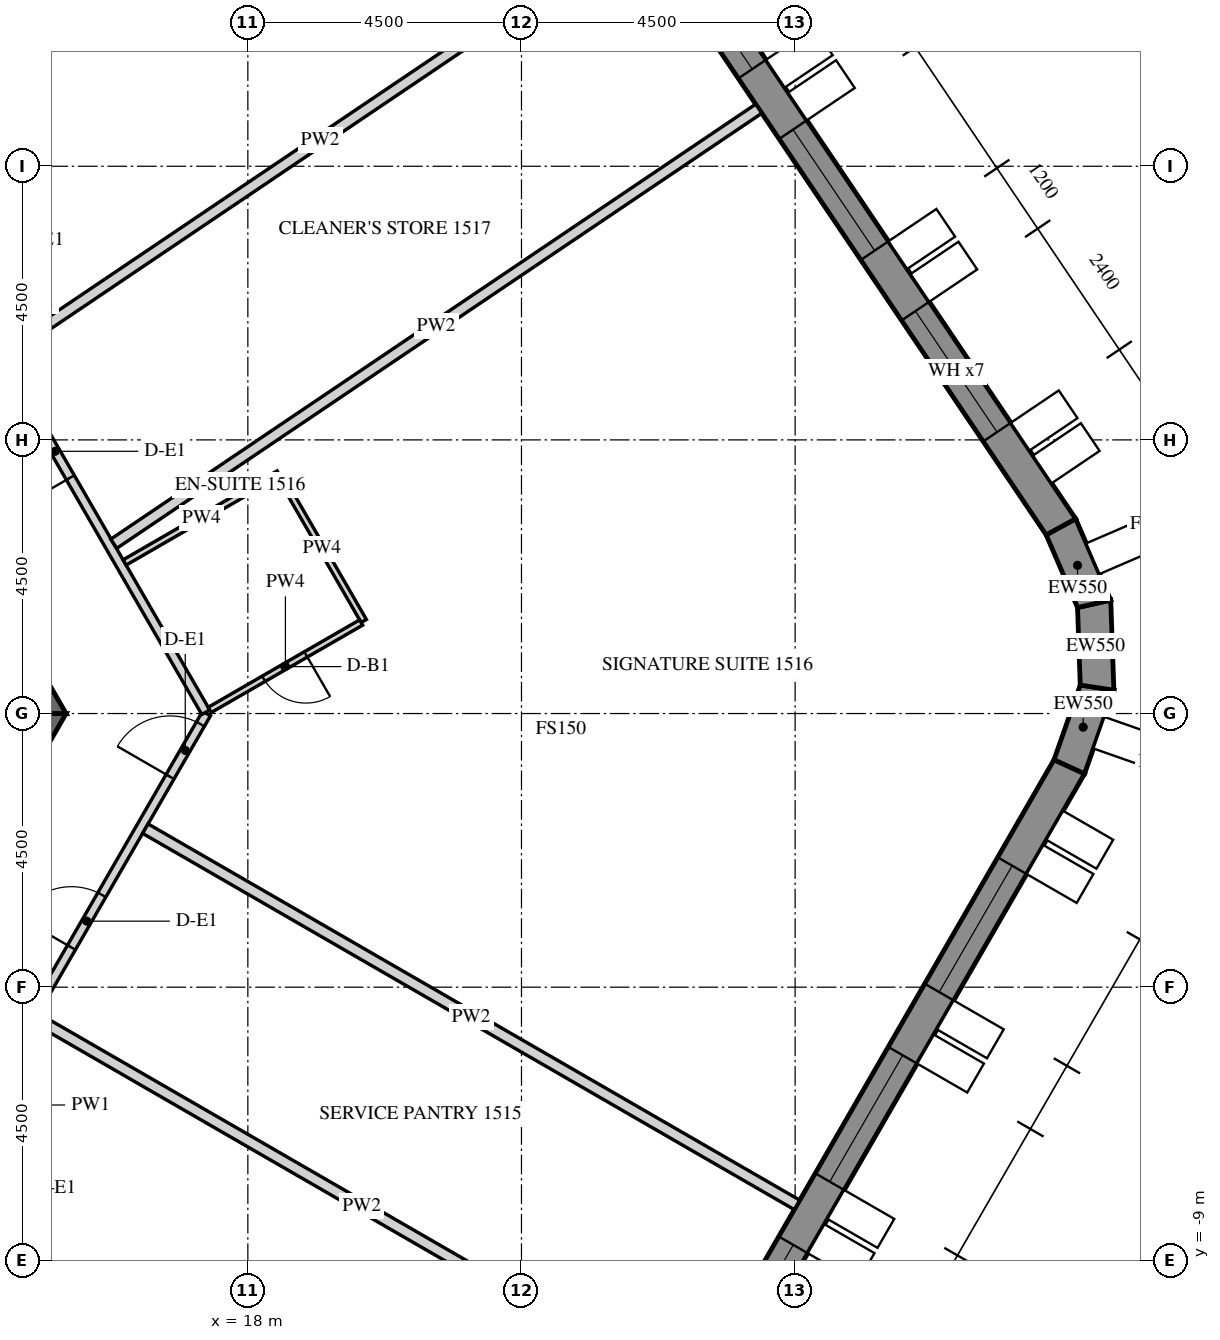
"""IFC4 building model, lengths in metres.
Left out: names, types, materials, properties, quantities, classifications, styles, units other than length and angle.
Written with IfcOpenShell. Run it as: python <this file> out.ifc"""

import sys

from ifc_helpers import new_model, si_unit, direction, frame, frame_2d, origin, place, context, subcontext, project, spatial, polyline, rectangle, outline, extrude, element, fill, save


model = new_model("IFC4")
c1 = context("Model", 3, precision=1e-05, world=origin(), true_north=direction((0.0, 1.0)))
c2 = subcontext(c1, "Body", "Model", "MODEL_VIEW")
j1 = project(units=[si_unit("LENGTHUNIT", "METRE"), si_unit("PLANEANGLEUNIT", "RADIAN")], contexts=[c1])
p1 = place(None, origin())
s1 = spatial("IfcSite", under=j1, at=p1, CompositionType="ELEMENT")
p2 = place(p1, origin())
s2 = spatial("IfcBuilding", under=s1, at=p2, CompositionType="ELEMENT")
p3 = place(p2, frame((0.0, 0.0, 195.6)))
s3 = spatial("IfcBuildingStorey", under=s2, at=p3, CompositionType="ELEMENT", Elevation=195.6)
p4 = place(p3, frame((17.63, -24.914, -0.15), z_axis=(0.0, 0.0, 1.0), x_axis=(0.499998569178, 0.866026229868, 0.0)))
e1 = element("IfcWall", 1, at=p4, inside=s3, PredefinedType="SOLIDWALL", context=c2, shape_type="SweptSolid", body=[
    extrude(outline(polyline([(-0.022, -0.275), (27.783, -0.275), (27.732, 0.275), (0.022, 0.275), (-0.022, -0.275)])), origin(), (0.0, 0.0, 1.0), 3.9),
])
p5 = place(p4, frame((1.879, 0.0, 1.05)))
e2 = element("IfcOpeningElement", 2, at=p5, cuts=e1, PredefinedType="OPENING", context=c2, shape_type="SweptSolid", body=[
    extrude(rectangle(XDim=2.4, YDim=2.4, at=frame_2d((1.2, 1.2))), frame((0.0, 0.285, 0.0), z_axis=(0.0, -1.0, 0.0), x_axis=(1.0, 0.0, 0.0)), (0.0, 0.0, 1.0), 0.57),
])
p6 = place(p4, frame((5.479, 0.0, 1.05)))
e3 = element("IfcOpeningElement", 3, at=p6, cuts=e1, PredefinedType="OPENING", context=c2, shape_type="SweptSolid", body=[
    extrude(rectangle(XDim=2.4, YDim=2.4, at=frame_2d((1.2, 1.2))), frame((0.0, 0.285, 0.0), z_axis=(0.0, -1.0, 0.0), x_axis=(1.0, 0.0, 0.0)), (0.0, 0.0, 1.0), 0.57),
])
p7 = place(p4, frame((9.079, 0.0, 1.05)))
e4 = element("IfcOpeningElement", 4, at=p7, cuts=e1, PredefinedType="OPENING", context=c2, shape_type="SweptSolid", body=[
    extrude(rectangle(XDim=2.4, YDim=2.4, at=frame_2d((1.2, 1.2))), frame((0.0, 0.285, 0.0), z_axis=(0.0, -1.0, 0.0), x_axis=(1.0, 0.0, 0.0)), (0.0, 0.0, 1.0), 0.57),
])
p8 = place(p4, frame((12.679, 0.0, 1.05)))
e5 = element("IfcOpeningElement", 5, at=p8, cuts=e1, PredefinedType="OPENING", context=c2, shape_type="SweptSolid", body=[
    extrude(rectangle(XDim=2.4, YDim=2.4, at=frame_2d((1.2, 1.2))), frame((0.0, 0.285, 0.0), z_axis=(0.0, -1.0, 0.0), x_axis=(1.0, 0.0, 0.0)), (0.0, 0.0, 1.0), 0.57),
])
p9 = place(p4, frame((16.279, 0.0, 1.05)))
e6 = element("IfcOpeningElement", 6, at=p9, cuts=e1, PredefinedType="OPENING", context=c2, shape_type="SweptSolid", body=[
    extrude(rectangle(XDim=2.4, YDim=2.4, at=frame_2d((1.2, 1.2))), frame((0.0, 0.285, 0.0), z_axis=(0.0, -1.0, 0.0), x_axis=(1.0, 0.0, 0.0)), (0.0, 0.0, 1.0), 0.57),
])
p10 = place(p4, frame((19.879, 0.0, 1.05)))
e7 = element("IfcOpeningElement", 7, at=p10, cuts=e1, PredefinedType="OPENING", context=c2, shape_type="SweptSolid", body=[
    extrude(rectangle(XDim=2.4, YDim=2.4, at=frame_2d((1.2, 1.2))), frame((0.0, 0.285, 0.0), z_axis=(0.0, -1.0, 0.0), x_axis=(1.0, 0.0, 0.0)), (0.0, 0.0, 1.0), 0.57),
])
p11 = place(p4, frame((23.479, 0.0, 1.05)))
e8 = element("IfcOpeningElement", 8, at=p11, cuts=e1, PredefinedType="OPENING", context=c2, shape_type="SweptSolid", body=[
    extrude(rectangle(XDim=2.4, YDim=2.4, at=frame_2d((1.2, 1.2))), frame((0.0, 0.285, 0.0), z_axis=(0.0, -1.0, 0.0), x_axis=(1.0, 0.0, 0.0)), (0.0, 0.0, 1.0), 0.57),
])
p12 = place(p3, frame((31.509, -0.875, -0.15), z_axis=(0.0, 0.0, 1.0), x_axis=(0.33111537203, 0.943590276765, 0.0)))
e9 = element("IfcWall", 9, at=p12, inside=s3, PredefinedType="SOLIDWALL", context=c2, shape_type="SweptSolid", body=[
    extrude(outline(polyline([(-0.026, -0.275), (1.431, -0.275), (1.327, 0.275), (0.026, 0.275), (-0.026, -0.275)])), origin(), (0.0, 0.0, 1.0), 3.9),
])
p13 = place(p3, frame((31.966, 0.426, -0.15), z_axis=(0.0, 0.0, 1.0), x_axis=(-0.034876908462, 0.999391615562, 0.0)))
e10 = element("IfcWall", 10, at=p13, inside=s3, PredefinedType="SOLIDWALL", context=c2, shape_type="SweptSolid", body=[
    extrude(outline(polyline([(-0.052, -0.275), (1.431, -0.275), (1.327, 0.275), (0.052, 0.275), (-0.052, -0.275)])), origin(), (0.0, 0.0, 1.0), 3.9),
])
p14 = place(p3, frame((31.917, 1.804, -0.15), z_axis=(0.0, 0.0, 1.0), x_axis=(-0.396225741392, 0.918153125496, 0.0)))
e11 = element("IfcWall", 11, at=p14, inside=s3, PredefinedType="SOLIDWALL", context=c2, shape_type="SweptSolid", body=[
    extrude(outline(polyline([(-0.052, -0.275), (1.405, -0.275), (1.353, 0.275), (0.052, 0.275), (-0.052, -0.275)])), origin(), (0.0, 0.0, 1.0), 3.9),
])
p15 = place(p3, frame((31.371, 3.071, -0.15), z_axis=(0.0, 0.0, 1.0), x_axis=(-0.559189891278, 0.829039604297, 0.0)))
e12 = element("IfcWall", 12, at=p15, inside=s3, PredefinedType="SOLIDWALL", context=c2, shape_type="SweptSolid", body=[
    extrude(outline(polyline([(-0.026, -0.275), (27.781, -0.275), (27.736, 0.275), (0.026, 0.275), (-0.026, -0.275)])), origin(), (0.0, 0.0, 1.0), 3.9),
])
p16 = place(p15, frame((1.879, 0.0, 1.05)))
e13 = element("IfcOpeningElement", 13, at=p16, cuts=e12, PredefinedType="OPENING", context=c2, shape_type="SweptSolid", body=[
    extrude(rectangle(XDim=2.4, YDim=2.4, at=frame_2d((1.2, 1.2))), frame((0.0, 0.285, 0.0), z_axis=(0.0, -1.0, 0.0), x_axis=(1.0, 0.0, 0.0)), (0.0, 0.0, 1.0), 0.57),
])
p17 = place(p15, frame((5.479, 0.0, 1.05)))
e14 = element("IfcOpeningElement", 14, at=p17, cuts=e12, PredefinedType="OPENING", context=c2, shape_type="SweptSolid", body=[
    extrude(rectangle(XDim=2.4, YDim=2.4, at=frame_2d((1.2, 1.2))), frame((0.0, 0.285, 0.0), z_axis=(0.0, -1.0, 0.0), x_axis=(1.0, 0.0, 0.0)), (0.0, 0.0, 1.0), 0.57),
])
p18 = place(p15, frame((9.079, 0.0, 1.05)))
e15 = element("IfcOpeningElement", 15, at=p18, cuts=e12, PredefinedType="OPENING", context=c2, shape_type="SweptSolid", body=[
    extrude(rectangle(XDim=2.4, YDim=2.4, at=frame_2d((1.2, 1.2))), frame((0.0, 0.285, 0.0), z_axis=(0.0, -1.0, 0.0), x_axis=(1.0, 0.0, 0.0)), (0.0, 0.0, 1.0), 0.57),
])
p19 = place(p15, frame((12.679, 0.0, 1.05)))
e16 = element("IfcOpeningElement", 16, at=p19, cuts=e12, PredefinedType="OPENING", context=c2, shape_type="SweptSolid", body=[
    extrude(rectangle(XDim=2.4, YDim=2.4, at=frame_2d((1.2, 1.2))), frame((0.0, 0.285, 0.0), z_axis=(0.0, -1.0, 0.0), x_axis=(1.0, 0.0, 0.0)), (0.0, 0.0, 1.0), 0.57),
])
p20 = place(p15, frame((16.279, 0.0, 1.05)))
e17 = element("IfcOpeningElement", 17, at=p20, cuts=e12, PredefinedType="OPENING", context=c2, shape_type="SweptSolid", body=[
    extrude(rectangle(XDim=2.4, YDim=2.4, at=frame_2d((1.2, 1.2))), frame((0.0, 0.285, 0.0), z_axis=(0.0, -1.0, 0.0), x_axis=(1.0, 0.0, 0.0)), (0.0, 0.0, 1.0), 0.57),
])
p21 = place(p15, frame((19.879, 0.0, 1.05)))
e18 = element("IfcOpeningElement", 18, at=p21, cuts=e12, PredefinedType="OPENING", context=c2, shape_type="SweptSolid", body=[
    extrude(rectangle(XDim=2.4, YDim=2.4, at=frame_2d((1.2, 1.2))), frame((0.0, 0.285, 0.0), z_axis=(0.0, -1.0, 0.0), x_axis=(1.0, 0.0, 0.0)), (0.0, 0.0, 1.0), 0.57),
])
p22 = place(p15, frame((23.479, 0.0, 1.05)))
e19 = element("IfcOpeningElement", 19, at=p22, cuts=e12, PredefinedType="OPENING", context=c2, shape_type="SweptSolid", body=[
    extrude(rectangle(XDim=2.4, YDim=2.4, at=frame_2d((1.2, 1.2))), frame((0.0, 0.285, 0.0), z_axis=(0.0, -1.0, 0.0), x_axis=(1.0, 0.0, 0.0)), (0.0, 0.0, 1.0), 0.57),
])
p23 = place(p3, frame((7.361, -12.75, -0.15), z_axis=(0.0, 0.0, 1.0), x_axis=(0.50000571537, 0.866022103989, 0.0)))
e20 = element("IfcWall", 20, at=p23, inside=s3, PredefinedType="SHEAR", context=c2, shape_type="SweptSolid", body=[
    extrude(outline(polyline([(-0.144, -0.25), (14.867, -0.25), (14.578, 0.25), (0.144, 0.25), (-0.144, -0.25)])), origin(), (0.0, 0.0, 1.0), 3.9),
])
p24 = place(p23, frame((6.49, 0.0, 0.15)))
e21 = element("IfcOpeningElement", 21, at=p24, cuts=e20, PredefinedType="OPENING", context=c2, shape_type="SweptSolid", body=[
    extrude(rectangle(XDim=1.8, YDim=2.4, at=frame_2d((0.9, 1.2))), frame((0.0, 0.26, 0.0), z_axis=(0.0, -1.0, 0.0), x_axis=(1.0, 0.0, 0.0)), (0.0, 0.0, 1.0), 0.52),
])
p25 = place(p3, frame((14.722, 0.0, -0.15), z_axis=(0.0, 0.0, 1.0), x_axis=(-0.50000571537, 0.866022103989, 0.0)))
e22 = element("IfcWall", 22, at=p25, inside=s3, PredefinedType="SHEAR", context=c2, shape_type="SweptSolid", body=[
    extrude(outline(polyline([(-0.144, -0.25), (14.867, -0.25), (14.578, 0.25), (0.144, 0.25), (-0.144, -0.25)])), origin(), (0.0, 0.0, 1.0), 3.9),
])
p26 = place(p25, frame((6.432, 0.0, 0.15)))
e23 = element("IfcOpeningElement", 23, at=p26, cuts=e22, PredefinedType="OPENING", context=c2, shape_type="SweptSolid", body=[
    extrude(rectangle(XDim=1.8, YDim=2.4, at=frame_2d((0.9, 1.2))), frame((0.0, 0.26, 0.0), z_axis=(0.0, -1.0, 0.0), x_axis=(1.0, 0.0, 0.0)), (0.0, 0.0, 1.0), 0.52),
])
p27 = place(p3, frame((9.887, -12.875, 0.0), z_axis=(0.0, 0.0, 1.0), x_axis=(0.499998228944, 0.866026426302, 0.0)))
e24 = element("IfcWall", 24, at=p27, inside=s3, PredefinedType="PARTITIONING", context=c2, shape_type="SweptSolid", body=[
    extrude(rectangle(XDim=14.867, YDim=0.15, at=frame_2d((7.433, 0.0))), origin(), (0.0, 0.0, 1.0), 2.988),
])
p28 = place(p27, frame((3.519, 0.0, 0.0)))
e25 = element("IfcOpeningElement", 25, at=p28, cuts=e24, PredefinedType="OPENING", context=c2, shape_type="SweptSolid", body=[
    extrude(rectangle(XDim=1.0, YDim=2.1, at=frame_2d((0.5, 1.05))), frame((0.0, 0.085, 0.0), z_axis=(0.0, -1.0, 0.0), x_axis=(1.0, 0.0, 0.0)), (0.0, 0.0, 1.0), 0.17),
])
p29 = place(p27, frame((6.824, 0.0, 0.0)))
e26 = element("IfcOpeningElement", 26, at=p29, cuts=e24, PredefinedType="OPENING", context=c2, shape_type="SweptSolid", body=[
    extrude(rectangle(XDim=1.0, YDim=2.1, at=frame_2d((0.5, 1.05))), frame((0.0, 0.085, 0.0), z_axis=(0.0, -1.0, 0.0), x_axis=(1.0, 0.0, 0.0)), (0.0, 0.0, 1.0), 0.17),
])
p30 = place(p27, frame((10.424, 0.0, 0.0)))
e27 = element("IfcOpeningElement", 27, at=p30, cuts=e24, PredefinedType="OPENING", context=c2, shape_type="SweptSolid", body=[
    extrude(rectangle(XDim=1.0, YDim=2.1, at=frame_2d((0.5, 1.05))), frame((0.0, 0.085, 0.0), z_axis=(0.0, -1.0, 0.0), x_axis=(1.0, 0.0, 0.0)), (0.0, 0.0, 1.0), 0.17),
])
p31 = place(p27, frame((13.667, 0.0, 0.0)))
e28 = element("IfcOpeningElement", 28, at=p31, cuts=e24, PredefinedType="OPENING", context=c2, shape_type="SweptSolid", body=[
    extrude(rectangle(XDim=1.0, YDim=2.1, at=frame_2d((0.5, 1.05))), frame((0.0, 0.085, 0.0), z_axis=(0.0, -1.0, 0.0), x_axis=(1.0, 0.0, 0.0)), (0.0, 0.0, 1.0), 0.17),
])
p32 = place(p3, frame((17.308, 0.022, 0.0), z_axis=(0.0, 0.0, 1.0), x_axis=(-0.500009245501, 0.866020065826, 0.0)))
e29 = element("IfcWall", 29, at=p32, inside=s3, PredefinedType="PARTITIONING", context=c2, shape_type="SweptSolid", body=[
    extrude(rectangle(XDim=13.976, YDim=0.15, at=frame_2d((6.988, 0.0))), origin(), (0.0, 0.0, 1.0), 2.988),
])
p33 = place(p32, frame((4.454, 0.0, 0.0)))
e30 = element("IfcOpeningElement", 30, at=p33, cuts=e29, PredefinedType="OPENING", context=c2, shape_type="SweptSolid", body=[
    extrude(rectangle(XDim=1.0, YDim=2.1, at=frame_2d((0.5, 1.05))), frame((0.0, 0.085, 0.0), z_axis=(0.0, -1.0, 0.0), x_axis=(1.0, 0.0, 0.0)), (0.0, 0.0, 1.0), 0.17),
])
p34 = place(p32, frame((8.471, 0.0, 0.0)))
e31 = element("IfcOpeningElement", 31, at=p34, cuts=e29, PredefinedType="OPENING", context=c2, shape_type="SweptSolid", body=[
    extrude(rectangle(XDim=1.0, YDim=2.1, at=frame_2d((0.5, 1.05))), frame((0.0, 0.085, 0.0), z_axis=(0.0, -1.0, 0.0), x_axis=(1.0, 0.0, 0.0)), (0.0, 0.0, 1.0), 0.17),
])
p35 = place(p3, frame((23.431, -14.316, 0.0), z_axis=(0.0, 0.0, 1.0), x_axis=(-0.866024931941, 0.500000817256, 0.0)))
e32 = element("IfcWall", 32, at=p35, inside=s3, PredefinedType="PARTITIONING", context=c2, shape_type="SweptSolid", body=[
    extrude(rectangle(XDim=12.375, YDim=0.18, at=frame_2d((6.188, 0.0))), origin(), (0.0, 0.0, 1.0), 2.988),
])
p36 = place(p3, frame((25.231, -11.198, 0.0), z_axis=(0.0, 0.0, 1.0), x_axis=(-0.866029863972, 0.499992274648, 0.0)))
e33 = element("IfcWall", 33, at=p36, inside=s3, PredefinedType="PARTITIONING", context=c2, shape_type="SweptSolid", body=[
    extrude(rectangle(XDim=12.375, YDim=0.18, at=frame_2d((6.188, 0.0))), origin(), (0.0, 0.0, 1.0), 2.988),
])
p37 = place(p3, frame((27.031, -8.08, 0.0), z_axis=(0.0, 0.0, 1.0), x_axis=(-0.866024931941, 0.500000817256, 0.0)))
e34 = element("IfcWall", 34, at=p37, inside=s3, PredefinedType="PARTITIONING", context=c2, shape_type="SweptSolid", body=[
    extrude(rectangle(XDim=12.375, YDim=0.18, at=frame_2d((6.188, 0.0))), origin(), (0.0, 0.0, 1.0), 2.988),
])
p38 = place(p3, frame((15.973, 2.484, 0.0), z_axis=(0.0, 0.0, 1.0), x_axis=(0.866025730634, 0.499999433879, 0.0)))
e35 = element("IfcWall", 35, at=p38, inside=s3, PredefinedType="PARTITIONING", context=c2, shape_type="SweptSolid", body=[
    extrude(rectangle(XDim=2.925, YDim=0.1, at=frame_2d((1.462, 0.0))), origin(), (0.0, 0.0, 1.0), 2.988),
])
p39 = place(p3, frame((18.531, 3.904, 0.0), z_axis=(0.0, 0.0, 1.0), x_axis=(0.499996545922, -0.866027397988, 0.0)))
e36 = element("IfcWall", 36, at=p39, inside=s3, PredefinedType="PARTITIONING", context=c2, shape_type="SweptSolid", body=[
    extrude(rectangle(XDim=2.75, YDim=0.1, at=frame_2d((1.375, 0.0))), origin(), (0.0, 0.0, 1.0), 2.988),
])
p40 = place(p3, frame((19.863, 1.497, 0.0), z_axis=(0.0, 0.0, 1.0), x_axis=(-0.866018712932, -0.500011588718, 0.0)))
e37 = element("IfcWall", 37, at=p40, inside=s3, PredefinedType="PARTITIONING", context=c2, shape_type="SweptSolid", body=[
    extrude(rectangle(XDim=2.875, YDim=0.1, at=frame_2d((1.438, 0.0))), origin(), (0.0, 0.0, 1.0), 2.988),
])
p41 = place(p40, frame((1.05, 0.0, 0.0)))
e38 = element("IfcOpeningElement", 38, at=p41, cuts=e37, PredefinedType="OPENING", context=c2, shape_type="SweptSolid", body=[
    extrude(rectangle(XDim=0.8, YDim=2.1, at=frame_2d((0.4, 1.05))), frame((0.0, 0.06, 0.0), z_axis=(0.0, -1.0, 0.0), x_axis=(1.0, 0.0, 0.0)), (0.0, 0.0, 1.0), 0.12),
])
p42 = place(p3, frame((26.402, 9.946, 0.0), z_axis=(0.0, 0.0, 1.0), x_axis=(-0.829037771727, -0.559192608187, 0.0)))
e39 = element("IfcWall", 39, at=p42, inside=s3, PredefinedType="PARTITIONING", context=c2, shape_type="SweptSolid", body=[
    extrude(rectangle(XDim=12.794, YDim=0.18, at=frame_2d((6.397, 0.0))), origin(), (0.0, 0.0, 1.0), 2.988),
])
p43 = place(p3, frame((24.389, 12.931, 0.0), z_axis=(0.0, 0.0, 1.0), x_axis=(-0.829040439793, -0.559188652593, 0.0)))
e40 = element("IfcWall", 40, at=p43, inside=s3, PredefinedType="PARTITIONING", context=c2, shape_type="SweptSolid", body=[
    extrude(rectangle(XDim=12.542, YDim=0.18, at=frame_2d((6.271, 0.0))), origin(), (0.0, 0.0, 1.0), 2.988),
])
p44 = place(p9, frame((0.0, 0.205, 0.0)))
e41 = element("IfcWindow", 41, at=p44, inside=s3, PartitioningType="DOUBLE_PANEL_VERTICAL", PredefinedType="WINDOW", context=c2, shape_type="SweptSolid", body=[
    extrude(rectangle(XDim=2.4, YDim=2.4, at=frame_2d((1.2, 1.2))), frame((0.0, 0.03, 0.0), z_axis=(0.0, -1.0, 0.0), x_axis=(1.0, 0.0, 0.0)), (0.0, 0.0, 1.0), 0.06),
])
fill(e6, e41)
p45 = place(p10, frame((0.0, 0.205, 0.0)))
e42 = element("IfcWindow", 42, at=p45, inside=s3, PartitioningType="DOUBLE_PANEL_VERTICAL", PredefinedType="WINDOW", context=c2, shape_type="SweptSolid", body=[
    extrude(rectangle(XDim=2.4, YDim=2.4, at=frame_2d((1.2, 1.2))), frame((0.0, 0.03, 0.0), z_axis=(0.0, -1.0, 0.0), x_axis=(1.0, 0.0, 0.0)), (0.0, 0.0, 1.0), 0.06),
])
fill(e7, e42)
p46 = place(p11, frame((0.0, 0.205, 0.0)))
e43 = element("IfcWindow", 43, at=p46, inside=s3, PartitioningType="DOUBLE_PANEL_VERTICAL", PredefinedType="WINDOW", context=c2, shape_type="SweptSolid", body=[
    extrude(rectangle(XDim=2.4, YDim=2.4, at=frame_2d((1.2, 1.2))), frame((0.0, 0.03, 0.0), z_axis=(0.0, -1.0, 0.0), x_axis=(1.0, 0.0, 0.0)), (0.0, 0.0, 1.0), 0.06),
])
fill(e8, e43)
p47 = place(p16, frame((0.0, 0.205, 0.0)))
e44 = element("IfcWindow", 44, at=p47, inside=s3, PartitioningType="DOUBLE_PANEL_VERTICAL", PredefinedType="WINDOW", context=c2, shape_type="SweptSolid", body=[
    extrude(rectangle(XDim=2.4, YDim=2.4, at=frame_2d((1.2, 1.2))), frame((0.0, 0.03, 0.0), z_axis=(0.0, -1.0, 0.0), x_axis=(1.0, 0.0, 0.0)), (0.0, 0.0, 1.0), 0.06),
])
fill(e13, e44)
p48 = place(p17, frame((0.0, 0.205, 0.0)))
e45 = element("IfcWindow", 45, at=p48, inside=s3, PartitioningType="DOUBLE_PANEL_VERTICAL", PredefinedType="WINDOW", context=c2, shape_type="SweptSolid", body=[
    extrude(rectangle(XDim=2.4, YDim=2.4, at=frame_2d((1.2, 1.2))), frame((0.0, 0.03, 0.0), z_axis=(0.0, -1.0, 0.0), x_axis=(1.0, 0.0, 0.0)), (0.0, 0.0, 1.0), 0.06),
])
fill(e14, e45)
p49 = place(p18, frame((0.0, 0.205, 0.0)))
e46 = element("IfcWindow", 46, at=p49, inside=s3, PartitioningType="DOUBLE_PANEL_VERTICAL", PredefinedType="WINDOW", context=c2, shape_type="SweptSolid", body=[
    extrude(rectangle(XDim=2.4, YDim=2.4, at=frame_2d((1.2, 1.2))), frame((0.0, 0.03, 0.0), z_axis=(0.0, -1.0, 0.0), x_axis=(1.0, 0.0, 0.0)), (0.0, 0.0, 1.0), 0.06),
])
fill(e15, e46)
p50 = place(p30, origin())
e47 = element("IfcDoor", 47, at=p50, inside=s3, OperationType="SINGLE_SWING_RIGHT", PredefinedType="DOOR", context=c2, shape_type="SweptSolid", body=[
    extrude(rectangle(XDim=1.0, YDim=2.1, at=frame_2d((0.5, 1.05))), frame((0.0, 0.025, 0.0), z_axis=(0.0, -1.0, 0.0), x_axis=(1.0, 0.0, 0.0)), (0.0, 0.0, 1.0), 0.05),
])
fill(e27, e47)
p51 = place(p31, origin())
e48 = element("IfcDoor", 48, at=p51, inside=s3, OperationType="SINGLE_SWING_LEFT", PredefinedType="DOOR", context=c2, shape_type="SweptSolid", body=[
    extrude(rectangle(XDim=1.0, YDim=2.1, at=frame_2d((0.5, 1.05))), frame((0.0, 0.025, 0.0), z_axis=(0.0, -1.0, 0.0), x_axis=(1.0, 0.0, 0.0)), (0.0, 0.0, 1.0), 0.05),
])
fill(e28, e48)
p52 = place(p41, origin())
e49 = element("IfcDoor", 49, at=p52, inside=s3, OperationType="SINGLE_SWING_RIGHT", PredefinedType="DOOR", context=c2, shape_type="SweptSolid", body=[
    extrude(rectangle(XDim=0.8, YDim=2.1, at=frame_2d((0.4, 1.05))), frame((0.0, 0.025, 0.0), z_axis=(0.0, -1.0, 0.0), x_axis=(1.0, 0.0, 0.0)), (0.0, 0.0, 1.0), 0.05),
])
fill(e38, e49)
p53 = place(p33, origin())
e50 = element("IfcDoor", 50, at=p53, inside=s3, OperationType="SINGLE_SWING_LEFT", PredefinedType="DOOR", context=c2, shape_type="SweptSolid", body=[
    extrude(rectangle(XDim=1.0, YDim=2.1, at=frame_2d((0.5, 1.05))), frame((0.0, 0.025, 0.0), z_axis=(0.0, -1.0, 0.0), x_axis=(1.0, 0.0, 0.0)), (0.0, 0.0, 1.0), 0.05),
])
fill(e30, e50)
save(model, sys.argv[1])
